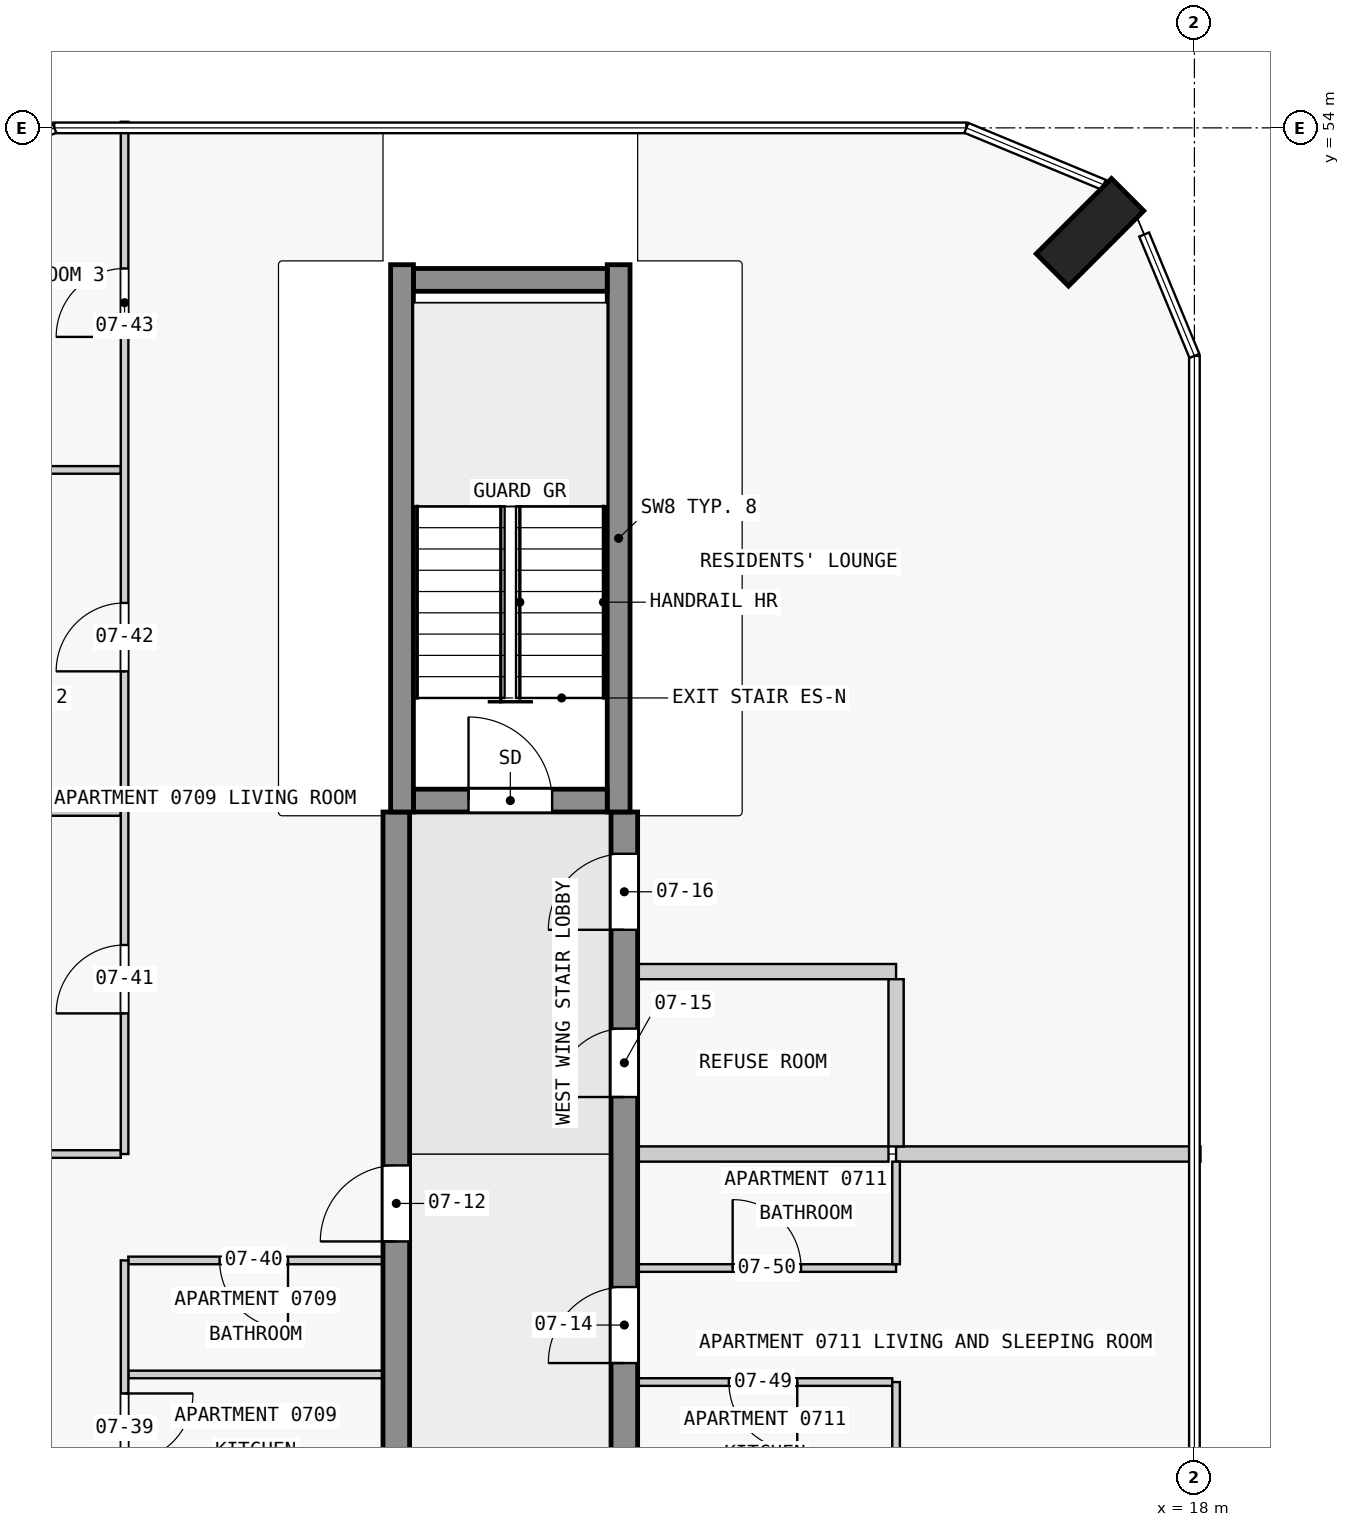
"""IFC4 building model, lengths in metres.
Left out: names, types, materials, properties, quantities, classifications, styles, units other than length and angle.
Written with IfcOpenShell. Run it as: python <this file> out.ifc"""

import sys

from ifc_helpers import new_model, si_unit, direction, frame, frame_2d, origin, origin_2d, place, context, subcontext, project, spatial, rectangle, extrude, element, fill, save


model = new_model("IFC4")
c1 = context("Model", 3, precision=1e-05, world=origin(), true_north=direction((0.0, 1.0)))
c2 = subcontext(c1, "Body", "Model", "MODEL_VIEW")
j1 = project(units=[si_unit("LENGTHUNIT", "METRE"), si_unit("PLANEANGLEUNIT", "RADIAN")], contexts=[c1])
p1 = place(None, origin())
s1 = spatial("IfcSite", under=j1, at=p1, CompositionType="ELEMENT")
p2 = place(p1, origin())
s2 = spatial("IfcBuilding", under=s1, at=p2, CompositionType="ELEMENT")
p3 = place(p2, frame((0.0, 0.0, 33.8)))
s3 = spatial("IfcBuildingStorey", under=s2, at=p3, CompositionType="ELEMENT", Elevation=33.8)
p4 = place(p3, frame((16.626, 52.626, 0.0), z_axis=(0.0, 0.0, 1.0), x_axis=(-0.707106781187, 0.707106781187, 0.0)))
e1 = element("IfcColumn", 1, at=p4, inside=s3, PredefinedType="COLUMN", context=c2, shape_type="SweptSolid", body=[
    extrude(rectangle(XDim=0.6, YDim=1.4, at=origin_2d()), origin(), (0.0, 0.0, 1.0), 3.5),
])
p5 = place(p3, frame((7.725, 45.15, 0.0), z_axis=(0.0, 0.0, 1.0), x_axis=(1.0, 0.0, 0.0)))
e2 = element("IfcWall", 2, at=p5, inside=s3, PredefinedType="SHEAR", context=c2, shape_type="SweptSolid", body=[
    extrude(rectangle(XDim=2.55, YDim=0.3, at=frame_2d((1.275, 0.0))), origin(), (0.0, 0.0, 1.0), 3.5),
])
p6 = place(p5, frame((0.725, 0.0, 0.0)))
e3 = element("IfcOpeningElement", 3, at=p6, cuts=e2, PredefinedType="OPENING", context=c2, shape_type="SweptSolid", body=[
    extrude(rectangle(XDim=1.1, YDim=2.1, at=frame_2d((0.55, 1.05))), frame((0.0, 0.16, 0.0), z_axis=(0.0, -1.0, 0.0), x_axis=(1.0, 0.0, 0.0)), (0.0, 0.0, 1.0), 0.32),
])
p7 = place(p3, frame((7.725, 52.0, 0.0), z_axis=(0.0, 0.0, 1.0), x_axis=(1.0, 0.0, 0.0)))
e4 = element("IfcWall", 4, at=p7, inside=s3, PredefinedType="SHEAR", context=c2, shape_type="SweptSolid", body=[
    extrude(rectangle(XDim=2.55, YDim=0.3, at=frame_2d((1.275, 0.0))), origin(), (0.0, 0.0, 1.0), 3.5),
])
for number, where, z_axis, x_axis in (
    (5, (7.575, 45.0, 0.0), (0.0, 0.0, 1.0), (0.0, 1.0, 0.0)),
    (6, (10.425, 45.0, 0.0), (0.0, 0.0, 1.0), (0.0, 1.0, 0.0)),
):
    element("IfcWall", number, at=place(p3, frame(where, z_axis=z_axis, x_axis=x_axis)), inside=s3, PredefinedType="SHEAR", context=c2, shape_type="SweptSolid", body=[
        extrude(rectangle(XDim=7.2, YDim=0.3, at=frame_2d((3.6, 0.0))), origin(), (0.0, 0.0, 1.0), 3.5),
    ])
p8 = place(p3, frame((7.5, 18.0, 0.0), z_axis=(0.0, 0.0, 1.0), x_axis=(0.0, 1.0, 0.0)))
e7 = element("IfcWall", 7, at=p8, inside=s3, PredefinedType="SHEAR", context=c2, shape_type="SweptSolid", body=[
    extrude(rectangle(XDim=27.0, YDim=0.35, at=frame_2d((13.5, 0.0))), origin(), (0.0, 0.0, 1.0), 3.25),
])
p9 = place(p8, frame((1.75, 0.0, 0.0)))
e8 = element("IfcOpeningElement", 8, at=p9, cuts=e7, PredefinedType="OPENING", context=c2, shape_type="SweptSolid", body=[
    extrude(rectangle(XDim=1.0, YDim=2.1, at=frame_2d((0.5, 1.05))), frame((0.0, 0.185, 0.0), z_axis=(0.0, -1.0, 0.0), x_axis=(1.0, 0.0, 0.0)), (0.0, 0.0, 1.0), 0.37),
])
p10 = place(p8, frame((8.55, 0.0, 0.0)))
e9 = element("IfcOpeningElement", 9, at=p10, cuts=e7, PredefinedType="OPENING", context=c2, shape_type="SweptSolid", body=[
    extrude(rectangle(XDim=1.0, YDim=2.1, at=frame_2d((0.5, 1.05))), frame((0.0, 0.185, 0.0), z_axis=(0.0, -1.0, 0.0), x_axis=(1.0, 0.0, 0.0)), (0.0, 0.0, 1.0), 0.37),
])
p11 = place(p8, frame((15.25, 0.0, 0.0)))
e10 = element("IfcOpeningElement", 10, at=p11, cuts=e7, PredefinedType="OPENING", context=c2, shape_type="SweptSolid", body=[
    extrude(rectangle(XDim=1.0, YDim=2.1, at=frame_2d((0.5, 1.05))), frame((0.0, 0.185, 0.0), z_axis=(0.0, -1.0, 0.0), x_axis=(1.0, 0.0, 0.0)), (0.0, 0.0, 1.0), 0.37),
])
p12 = place(p8, frame((21.35, 0.0, 0.0)))
e11 = element("IfcOpeningElement", 11, at=p12, cuts=e7, PredefinedType="OPENING", context=c2, shape_type="SweptSolid", body=[
    extrude(rectangle(XDim=1.0, YDim=2.1, at=frame_2d((0.5, 1.05))), frame((0.0, 0.185, 0.0), z_axis=(0.0, -1.0, 0.0), x_axis=(1.0, 0.0, 0.0)), (0.0, 0.0, 1.0), 0.37),
])
p13 = place(p3, frame((10.5, 18.0, 0.0), z_axis=(0.0, 0.0, 1.0), x_axis=(0.0, 1.0, 0.0)))
e12 = element("IfcWall", 12, at=p13, inside=s3, PredefinedType="SHEAR", context=c2, shape_type="SweptSolid", body=[
    extrude(rectangle(XDim=27.0, YDim=0.35, at=frame_2d((13.5, 0.0))), origin(), (0.0, 0.0, 1.0), 3.25),
])
p14 = place(p13, frame((7.45, 0.0, 0.0)))
e13 = element("IfcOpeningElement", 13, at=p14, cuts=e12, PredefinedType="OPENING", context=c2, shape_type="SweptSolid", body=[
    extrude(rectangle(XDim=1.0, YDim=2.1, at=frame_2d((0.5, 1.05))), frame((0.0, 0.185, 0.0), z_axis=(0.0, -1.0, 0.0), x_axis=(1.0, 0.0, 0.0)), (0.0, 0.0, 1.0), 0.37),
])
p15 = place(p13, frame((19.75, 0.0, 0.0)))
e14 = element("IfcOpeningElement", 14, at=p15, cuts=e12, PredefinedType="OPENING", context=c2, shape_type="SweptSolid", body=[
    extrude(rectangle(XDim=1.0, YDim=2.1, at=frame_2d((0.5, 1.05))), frame((0.0, 0.185, 0.0), z_axis=(0.0, -1.0, 0.0), x_axis=(1.0, 0.0, 0.0)), (0.0, 0.0, 1.0), 0.37),
])
p16 = place(p13, frame((23.25, 0.0, 0.0)))
e15 = element("IfcOpeningElement", 15, at=p16, cuts=e12, PredefinedType="OPENING", context=c2, shape_type="SweptSolid", body=[
    extrude(rectangle(XDim=0.9, YDim=2.1, at=frame_2d((0.45, 1.05))), frame((0.0, 0.185, 0.0), z_axis=(0.0, -1.0, 0.0), x_axis=(1.0, 0.0, 0.0)), (0.0, 0.0, 1.0), 0.37),
])
p17 = place(p13, frame((25.45, 0.0, 0.0)))
e16 = element("IfcOpeningElement", 16, at=p17, cuts=e12, PredefinedType="OPENING", context=c2, shape_type="SweptSolid", body=[
    extrude(rectangle(XDim=1.0, YDim=2.1, at=frame_2d((0.5, 1.05))), frame((0.0, 0.185, 0.0), z_axis=(0.0, -1.0, 0.0), x_axis=(1.0, 0.0, 0.0)), (0.0, 0.0, 1.0), 0.37),
])
p18 = place(p3, frame((14.025, 37.5, 0.0), z_axis=(0.0, 0.0, 1.0), x_axis=(-1.0, 0.0, 0.0)))
e17 = element("IfcWall", 17, at=p18, inside=s3, PredefinedType="PARTITIONING", context=c2, shape_type="SweptSolid", body=[
    extrude(rectangle(XDim=3.35, YDim=0.1, at=frame_2d((1.675, 0.0))), origin(), (0.0, 0.0, 1.0), 3.25),
])
p19 = place(p18, frame((1.25, 0.0, 0.0)))
e18 = element("IfcOpeningElement", 18, at=p19, cuts=e17, PredefinedType="OPENING", context=c2, shape_type="SweptSolid", body=[
    extrude(rectangle(XDim=0.9, YDim=2.1, at=frame_2d((0.45, 1.05))), frame((0.0, 0.06, 0.0), z_axis=(0.0, -1.0, 0.0), x_axis=(1.0, 0.0, 0.0)), (0.0, 0.0, 1.0), 0.12),
])
p20 = place(p3, frame((7.325, 37.6, 0.0), z_axis=(0.0, 0.0, 1.0), x_axis=(-1.0, 0.0, 0.0)))
e19 = element("IfcWall", 19, at=p20, inside=s3, PredefinedType="PARTITIONING", context=c2, shape_type="SweptSolid", body=[
    extrude(rectangle(XDim=3.35, YDim=0.1, at=frame_2d((1.675, 0.0))), origin(), (0.0, 0.0, 1.0), 3.25),
])
p21 = place(p3, frame((10.675, 39.0, 0.0), z_axis=(0.0, 0.0, 1.0), x_axis=(1.0, 0.0, 0.0)))
e20 = element("IfcWall", 20, at=p21, inside=s3, PredefinedType="PARTITIONING", context=c2, shape_type="SweptSolid", body=[
    extrude(rectangle(XDim=3.4, YDim=0.1, at=frame_2d((1.7, 0.0))), origin(), (0.0, 0.0, 1.0), 3.25),
])
p22 = place(p21, frame((1.25, 0.0, 0.0)))
e21 = element("IfcOpeningElement", 21, at=p22, cuts=e20, PredefinedType="OPENING", context=c2, shape_type="SweptSolid", body=[
    extrude(rectangle(XDim=0.9, YDim=2.1, at=frame_2d((0.45, 1.05))), frame((0.0, 0.06, 0.0), z_axis=(0.0, -1.0, 0.0), x_axis=(1.0, 0.0, 0.0)), (0.0, 0.0, 1.0), 0.12),
])
p23 = place(p3, frame((7.325, 39.1, 0.0), z_axis=(0.0, 0.0, 1.0), x_axis=(-1.0, 0.0, 0.0)))
e22 = element("IfcWall", 22, at=p23, inside=s3, PredefinedType="PARTITIONING", context=c2, shape_type="SweptSolid", body=[
    extrude(rectangle(XDim=3.35, YDim=0.1, at=frame_2d((1.675, 0.0))), origin(), (0.0, 0.0, 1.0), 3.25),
])
p24 = place(p23, frame((1.25, 0.0, 0.0)))
e23 = element("IfcOpeningElement", 23, at=p24, cuts=e22, PredefinedType="OPENING", context=c2, shape_type="SweptSolid", body=[
    extrude(rectangle(XDim=0.9, YDim=2.1, at=frame_2d((0.45, 1.05))), frame((0.0, 0.06, 0.0), z_axis=(0.0, -1.0, 0.0), x_axis=(1.0, 0.0, 0.0)), (0.0, 0.0, 1.0), 0.12),
])
p25 = place(p3, frame((0.15, 40.5, 0.0), z_axis=(0.0, 0.0, 1.0), x_axis=(1.0, 0.0, 0.0)))
e24 = element("IfcWall", 24, at=p25, inside=s3, PredefinedType="PARTITIONING", context=c2, shape_type="SweptSolid", body=[
    extrude(rectangle(XDim=3.725, YDim=0.1, at=frame_2d((1.863, 0.0))), origin(), (0.0, 0.0, 1.0), 3.25),
])
p26 = place(p3, frame((13.975, 40.5, 0.0), z_axis=(0.0, 0.0, 1.0), x_axis=(-1.0, 0.0, 0.0)))
e25 = element("IfcWall", 25, at=p26, inside=s3, PredefinedType="PARTITIONING", context=c2, shape_type="SweptSolid", body=[
    extrude(rectangle(XDim=3.3, YDim=0.2, at=frame_2d((1.65, 0.0))), origin(), (0.0, 0.0, 1.0), 3.25),
])
p27 = place(p3, frame((14.075, 40.5, 0.0), z_axis=(0.0, 0.0, 1.0), x_axis=(1.0, 0.0, 0.0)))
e26 = element("IfcWall", 26, at=p27, inside=s3, PredefinedType="PARTITIONING", context=c2, shape_type="SweptSolid", body=[
    extrude(rectangle(XDim=4.005, YDim=0.2, at=frame_2d((2.002, 0.0))), origin(), (0.0, 0.0, 1.0), 3.25),
])
p28 = place(p3, frame((14.075, 42.9, 0.0), z_axis=(0.0, 0.0, 1.0), x_axis=(-1.0, 0.0, 0.0)))
e27 = element("IfcWall", 27, at=p28, inside=s3, PredefinedType="PARTITIONING", context=c2, shape_type="SweptSolid", body=[
    extrude(rectangle(XDim=3.4, YDim=0.2, at=frame_2d((1.7, 0.0))), origin(), (0.0, 0.0, 1.0), 3.25),
])
p29 = place(p3, frame((3.875, 45.0, 0.0), z_axis=(0.0, 0.0, 1.0), x_axis=(-1.0, 0.0, 0.0)))
e28 = element("IfcWall", 28, at=p29, inside=s3, PredefinedType="PARTITIONING", context=c2, shape_type="SweptSolid", body=[
    extrude(rectangle(XDim=3.725, YDim=0.1, at=frame_2d((1.863, 0.0))), origin(), (0.0, 0.0, 1.0), 3.25),
])
p30 = place(p3, frame((3.875, 49.5, 0.0), z_axis=(0.0, 0.0, 1.0), x_axis=(-1.0, 0.0, 0.0)))
e29 = element("IfcWall", 29, at=p30, inside=s3, PredefinedType="PARTITIONING", context=c2, shape_type="SweptSolid", body=[
    extrude(rectangle(XDim=3.955, YDim=0.1, at=frame_2d((1.978, 0.0))), origin(), (0.0, 0.0, 1.0), 3.25),
])
p31 = place(p3, frame((3.925, 39.1, 0.0), z_axis=(0.0, 0.0, 1.0), x_axis=(0.0, -1.0, 0.0)))
e30 = element("IfcWall", 30, at=p31, inside=s3, PredefinedType="PARTITIONING", context=c2, shape_type="SweptSolid", body=[
    extrude(rectangle(XDim=3.0, YDim=0.1, at=frame_2d((1.5, 0.0))), origin(), (0.0, 0.0, 1.0), 3.25),
])
p32 = place(p31, frame((1.75, 0.0, 0.0)))
e31 = element("IfcOpeningElement", 31, at=p32, cuts=e30, PredefinedType="OPENING", context=c2, shape_type="SweptSolid", body=[
    extrude(rectangle(XDim=0.9, YDim=2.1, at=frame_2d((0.45, 1.05))), frame((0.0, 0.06, 0.0), z_axis=(0.0, -1.0, 0.0), x_axis=(1.0, 0.0, 0.0)), (0.0, 0.0, 1.0), 0.12),
])
p33 = place(p3, frame((3.925, 40.5, 0.0), z_axis=(0.0, 0.0, 1.0), x_axis=(0.0, 1.0, 0.0)))
e32 = element("IfcWall", 32, at=p33, inside=s3, PredefinedType="PARTITIONING", context=c2, shape_type="SweptSolid", body=[
    extrude(rectangle(XDim=13.58, YDim=0.1, at=frame_2d((6.79, 0.0))), origin(), (0.0, 0.0, 1.0), 3.25),
])
p34 = place(p33, frame((1.85, 0.0, 0.0)))
e33 = element("IfcOpeningElement", 33, at=p34, cuts=e32, PredefinedType="OPENING", context=c2, shape_type="SweptSolid", body=[
    extrude(rectangle(XDim=0.9, YDim=2.1, at=frame_2d((0.45, 1.05))), frame((0.0, 0.06, 0.0), z_axis=(0.0, -1.0, 0.0), x_axis=(1.0, 0.0, 0.0)), (0.0, 0.0, 1.0), 0.12),
])
p35 = place(p33, frame((6.35, 0.0, 0.0)))
e34 = element("IfcOpeningElement", 34, at=p35, cuts=e32, PredefinedType="OPENING", context=c2, shape_type="SweptSolid", body=[
    extrude(rectangle(XDim=0.9, YDim=2.1, at=frame_2d((0.45, 1.05))), frame((0.0, 0.06, 0.0), z_axis=(0.0, -1.0, 0.0), x_axis=(1.0, 0.0, 0.0)), (0.0, 0.0, 1.0), 0.12),
])
p36 = place(p33, frame((10.75, 0.0, 0.0)))
e35 = element("IfcOpeningElement", 35, at=p36, cuts=e32, PredefinedType="OPENING", context=c2, shape_type="SweptSolid", body=[
    extrude(rectangle(XDim=0.9, YDim=2.1, at=frame_2d((0.45, 1.05))), frame((0.0, 0.06, 0.0), z_axis=(0.0, -1.0, 0.0), x_axis=(1.0, 0.0, 0.0)), (0.0, 0.0, 1.0), 0.12),
])
p37 = place(p3, frame((14.075, 36.1, 0.0), z_axis=(0.0, 0.0, 1.0), x_axis=(0.0, 1.0, 0.0)))
e36 = element("IfcWall", 36, at=p37, inside=s3, PredefinedType="PARTITIONING", context=c2, shape_type="SweptSolid", body=[
    extrude(rectangle(XDim=1.4, YDim=0.1, at=frame_2d((0.7, 0.0))), origin(), (0.0, 0.0, 1.0), 3.25),
])
p38 = place(p3, frame((14.075, 39.05, 0.0), z_axis=(0.0, 0.0, 1.0), x_axis=(0.0, 1.0, 0.0)))
e37 = element("IfcWall", 37, at=p38, inside=s3, PredefinedType="PARTITIONING", context=c2, shape_type="SweptSolid", body=[
    extrude(rectangle(XDim=1.35, YDim=0.1, at=frame_2d((0.675, 0.0))), origin(), (0.0, 0.0, 1.0), 3.25),
])
p39 = place(p3, frame((14.075, 40.6, 0.0), z_axis=(0.0, 0.0, 1.0), x_axis=(0.0, 1.0, 0.0)))
e38 = element("IfcWall", 38, at=p39, inside=s3, PredefinedType="PARTITIONING", context=c2, shape_type="SweptSolid", body=[
    extrude(rectangle(XDim=2.2, YDim=0.2, at=frame_2d((1.1, 0.0))), origin(), (0.0, 0.0, 1.0), 3.25),
])
p40 = place(p6, origin())
e39 = element("IfcDoor", 39, at=p40, inside=s3, OperationType="SINGLE_SWING_LEFT", PredefinedType="DOOR", context=c2, shape_type="SweptSolid", body=[
    extrude(rectangle(XDim=1.1, YDim=2.1, at=frame_2d((0.55, 1.05))), frame((0.0, 0.025, 0.0), z_axis=(0.0, -1.0, 0.0), x_axis=(1.0, 0.0, 0.0)), (0.0, 0.0, 1.0), 0.05),
])
fill(e3, e39)
p41 = place(p12, origin())
e40 = element("IfcDoor", 40, at=p41, inside=s3, OperationType="SINGLE_SWING_RIGHT", PredefinedType="DOOR", context=c2, shape_type="SweptSolid", body=[
    extrude(rectangle(XDim=1.0, YDim=2.1, at=frame_2d((0.5, 1.05))), frame((0.0, 0.025, 0.0), z_axis=(0.0, -1.0, 0.0), x_axis=(1.0, 0.0, 0.0)), (0.0, 0.0, 1.0), 0.05),
])
fill(e11, e40)
p42 = place(p15, origin())
e41 = element("IfcDoor", 41, at=p42, inside=s3, OperationType="SINGLE_SWING_RIGHT", PredefinedType="DOOR", context=c2, shape_type="SweptSolid", body=[
    extrude(rectangle(XDim=1.0, YDim=2.1, at=frame_2d((0.5, 1.05))), frame((0.0, 0.025, 0.0), z_axis=(0.0, -1.0, 0.0), x_axis=(1.0, 0.0, 0.0)), (0.0, 0.0, 1.0), 0.05),
])
fill(e14, e41)
p43 = place(p16, origin())
e42 = element("IfcDoor", 42, at=p43, inside=s3, OperationType="SINGLE_SWING_RIGHT", PredefinedType="DOOR", context=c2, shape_type="SweptSolid", body=[
    extrude(rectangle(XDim=0.9, YDim=2.1, at=frame_2d((0.45, 1.05))), frame((0.0, 0.025, 0.0), z_axis=(0.0, -1.0, 0.0), x_axis=(1.0, 0.0, 0.0)), (0.0, 0.0, 1.0), 0.05),
])
fill(e15, e42)
p44 = place(p17, origin())
e43 = element("IfcDoor", 43, at=p44, inside=s3, OperationType="SINGLE_SWING_RIGHT", PredefinedType="DOOR", context=c2, shape_type="SweptSolid", body=[
    extrude(rectangle(XDim=1.0, YDim=2.1, at=frame_2d((0.5, 1.05))), frame((0.0, 0.025, 0.0), z_axis=(0.0, -1.0, 0.0), x_axis=(1.0, 0.0, 0.0)), (0.0, 0.0, 1.0), 0.05),
])
fill(e16, e43)
p45 = place(p32, origin())
e44 = element("IfcDoor", 44, at=p45, inside=s3, OperationType="SINGLE_SWING_RIGHT", PredefinedType="DOOR", context=c2, shape_type="SweptSolid", body=[
    extrude(rectangle(XDim=0.9, YDim=2.1, at=frame_2d((0.45, 1.05))), frame((0.0, 0.025, 0.0), z_axis=(0.0, -1.0, 0.0), x_axis=(1.0, 0.0, 0.0)), (0.0, 0.0, 1.0), 0.05),
])
fill(e31, e44)
p46 = place(p24, origin())
e45 = element("IfcDoor", 45, at=p46, inside=s3, OperationType="SINGLE_SWING_RIGHT", PredefinedType="DOOR", context=c2, shape_type="SweptSolid", body=[
    extrude(rectangle(XDim=0.9, YDim=2.1, at=frame_2d((0.45, 1.05))), frame((0.0, 0.025, 0.0), z_axis=(0.0, -1.0, 0.0), x_axis=(1.0, 0.0, 0.0)), (0.0, 0.0, 1.0), 0.05),
])
fill(e23, e45)
p47 = place(p34, origin())
e46 = element("IfcDoor", 46, at=p47, inside=s3, OperationType="SINGLE_SWING_LEFT", PredefinedType="DOOR", context=c2, shape_type="SweptSolid", body=[
    extrude(rectangle(XDim=0.9, YDim=2.1, at=frame_2d((0.45, 1.05))), frame((0.0, 0.025, 0.0), z_axis=(0.0, -1.0, 0.0), x_axis=(1.0, 0.0, 0.0)), (0.0, 0.0, 1.0), 0.05),
])
fill(e33, e46)
p48 = place(p35, origin())
e47 = element("IfcDoor", 47, at=p48, inside=s3, OperationType="SINGLE_SWING_RIGHT", PredefinedType="DOOR", context=c2, shape_type="SweptSolid", body=[
    extrude(rectangle(XDim=0.9, YDim=2.1, at=frame_2d((0.45, 1.05))), frame((0.0, 0.025, 0.0), z_axis=(0.0, -1.0, 0.0), x_axis=(1.0, 0.0, 0.0)), (0.0, 0.0, 1.0), 0.05),
])
fill(e34, e47)
p49 = place(p36, origin())
e48 = element("IfcDoor", 48, at=p49, inside=s3, OperationType="SINGLE_SWING_RIGHT", PredefinedType="DOOR", context=c2, shape_type="SweptSolid", body=[
    extrude(rectangle(XDim=0.9, YDim=2.1, at=frame_2d((0.45, 1.05))), frame((0.0, 0.025, 0.0), z_axis=(0.0, -1.0, 0.0), x_axis=(1.0, 0.0, 0.0)), (0.0, 0.0, 1.0), 0.05),
])
fill(e35, e48)
p50 = place(p19, origin())
e49 = element("IfcDoor", 49, at=p50, inside=s3, OperationType="SINGLE_SWING_RIGHT", PredefinedType="DOOR", context=c2, shape_type="SweptSolid", body=[
    extrude(rectangle(XDim=0.9, YDim=2.1, at=frame_2d((0.45, 1.05))), frame((0.0, 0.025, 0.0), z_axis=(0.0, -1.0, 0.0), x_axis=(1.0, 0.0, 0.0)), (0.0, 0.0, 1.0), 0.05),
])
fill(e18, e49)
p51 = place(p22, origin())
e50 = element("IfcDoor", 50, at=p51, inside=s3, OperationType="SINGLE_SWING_RIGHT", PredefinedType="DOOR", context=c2, shape_type="SweptSolid", body=[
    extrude(rectangle(XDim=0.9, YDim=2.1, at=frame_2d((0.45, 1.05))), frame((0.0, 0.025, 0.0), z_axis=(0.0, -1.0, 0.0), x_axis=(1.0, 0.0, 0.0)), (0.0, 0.0, 1.0), 0.05),
])
fill(e21, e50)
save(model, sys.argv[1])
